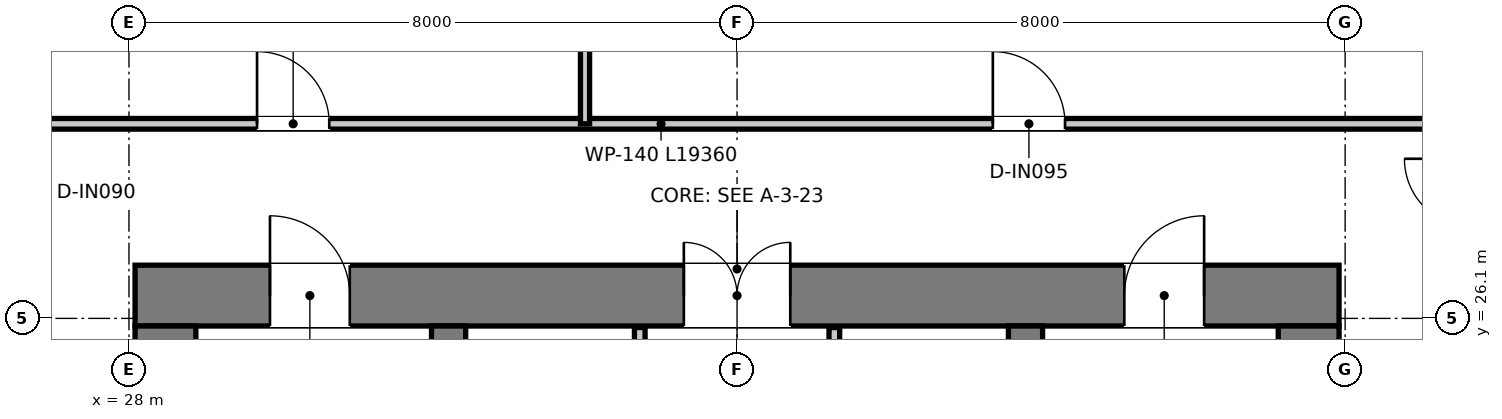
"""IFC4 building model, lengths in metres.
Left out: names, types, materials, properties, quantities, classifications, styles, units other than length and angle.
Written with IfcOpenShell. Run it as: python <this file> out.ifc"""

import sys

from ifc_helpers import new_model, si_unit, direction, frame, frame_2d, origin, place, context, subcontext, project, spatial, rectangle, extrude, element, fill, save


model = new_model("IFC4")
c1 = context("Model", 3, precision=1e-05, world=origin(), true_north=direction((0.0, 1.0)))
c2 = subcontext(c1, "Body", "Model", "MODEL_VIEW")
j1 = project(units=[si_unit("LENGTHUNIT", "METRE"), si_unit("PLANEANGLEUNIT", "RADIAN")], contexts=[c1])
p1 = place(None, origin())
s1 = spatial("IfcSite", under=j1, at=p1, CompositionType="ELEMENT")
p2 = place(p1, origin())
s2 = spatial("IfcBuilding", under=s1, at=p2, CompositionType="ELEMENT")
p3 = place(p2, frame((0.0, 0.0, 355.35)))
s3 = spatial("IfcBuildingStorey", under=s2, at=p3, CompositionType="ELEMENT", Elevation=355.35)
p4 = place(p3, frame((28.08, 26.4, 0.0), z_axis=(0.0, 0.0, 1.0), x_axis=(1.0, 0.0, 0.0)))
e1 = element("IfcWall", 1, at=p4, inside=s3, PredefinedType="SHEAR", context=c2, shape_type="SweptSolid", body=[
    extrude(rectangle(XDim=15.84, YDim=0.8, at=frame_2d((7.92, 0.0))), origin(), (0.0, 0.0, 1.0), 3.95),
])
p5 = place(p4, frame((7.22, 0.0, 0.0)))
e2 = element("IfcOpeningElement", 2, at=p5, cuts=e1, PredefinedType="OPENING", context=c2, shape_type="SweptSolid", body=[
    extrude(rectangle(XDim=1.4, YDim=2.2, at=frame_2d((0.7, 1.1))), frame((0.0, 0.41, 0.0), z_axis=(0.0, -1.0, 0.0), x_axis=(1.0, 0.0, 0.0)), (0.0, 0.0, 1.0), 0.82),
])
p6 = place(p4, frame((1.775, 0.0, 0.0)))
e3 = element("IfcOpeningElement", 3, at=p6, cuts=e1, PredefinedType="OPENING", context=c2, shape_type="SweptSolid", body=[
    extrude(rectangle(XDim=1.05, YDim=2.1, at=frame_2d((0.525, 1.05))), frame((0.0, 0.41, 0.0), z_axis=(0.0, -1.0, 0.0), x_axis=(1.0, 0.0, 0.0)), (0.0, 0.0, 1.0), 0.82),
])
p7 = place(p4, frame((13.015, 0.0, 0.0)))
e4 = element("IfcOpeningElement", 4, at=p7, cuts=e1, PredefinedType="OPENING", context=c2, shape_type="SweptSolid", body=[
    extrude(rectangle(XDim=1.05, YDim=2.1, at=frame_2d((0.525, 1.05))), frame((0.0, 0.41, 0.0), z_axis=(0.0, -1.0, 0.0), x_axis=(1.0, 0.0, 0.0)), (0.0, 0.0, 1.0), 0.82),
])
for number, where, z_axis, x_axis in (
    (5, (28.48, 11.3, 0.0), (0.0, 0.0, 1.0), (0.0, 1.0, 0.0)),
    (6, (43.52, 11.3, 0.0), (0.0, 0.0, 1.0), (0.0, 1.0, 0.0)),
):
    element("IfcWall", number, at=place(p3, frame(where, z_axis=z_axis, x_axis=x_axis)), inside=s3, PredefinedType="SHEAR", context=c2, shape_type="SweptSolid", body=[
        extrude(rectangle(XDim=14.7, YDim=0.8, at=frame_2d((7.35, 0.0))), origin(), (0.0, 0.0, 1.0), 3.95),
    ])
p8 = place(p3, frame((32.205, 13.22, 0.0), z_axis=(0.0, 0.0, 1.0), x_axis=(0.0, 1.0, 0.0)))
e7 = element("IfcWall", 7, at=p8, inside=s3, PredefinedType="SHEAR", context=c2, shape_type="SweptSolid", body=[
    extrude(rectangle(XDim=12.78, YDim=0.45, at=frame_2d((6.39, 0.0))), origin(), (0.0, 0.0, 1.0), 3.95),
])
p9 = place(p8, frame((10.58, 0.0, 0.0)))
e8 = element("IfcOpeningElement", 8, at=p9, cuts=e7, PredefinedType="OPENING", context=c2, shape_type="SweptSolid", body=[
    extrude(rectangle(XDim=1.1, YDim=2.15, at=frame_2d((0.55, 1.075))), frame((0.0, 0.235, 0.0), z_axis=(0.0, -1.0, 0.0), x_axis=(1.0, 0.0, 0.0)), (0.0, 0.0, 1.0), 0.47),
])
p10 = place(p3, frame((39.795, 13.22, 0.0), z_axis=(0.0, 0.0, 1.0), x_axis=(0.0, 1.0, 0.0)))
e9 = element("IfcWall", 9, at=p10, inside=s3, PredefinedType="SHEAR", context=c2, shape_type="SweptSolid", body=[
    extrude(rectangle(XDim=12.78, YDim=0.45, at=frame_2d((6.39, 0.0))), origin(), (0.0, 0.0, 1.0), 3.95),
])
p11 = place(p10, frame((10.58, 0.0, 0.0)))
e10 = element("IfcOpeningElement", 10, at=p11, cuts=e9, PredefinedType="OPENING", context=c2, shape_type="SweptSolid", body=[
    extrude(rectangle(XDim=1.1, YDim=2.15, at=frame_2d((0.55, 1.075))), frame((0.0, 0.235, 0.0), z_axis=(0.0, -1.0, 0.0), x_axis=(1.0, 0.0, 0.0)), (0.0, 0.0, 1.0), 0.47),
])
p12 = place(p3, frame((34.72, 20.2, 0.0), z_axis=(0.0, 0.0, 1.0), x_axis=(0.0, 1.0, 0.0)))
e11 = element("IfcWall", 11, at=p12, inside=s3, PredefinedType="PARTITIONING", context=c2, shape_type="SweptSolid", body=[
    extrude(rectangle(XDim=5.78, YDim=0.14, at=frame_2d((2.89, 0.0))), origin(), (0.0, 0.0, 1.0), 2.82),
])
p13 = place(p12, frame((1.05, 0.0, 0.0)))
e12 = element("IfcOpeningElement", 12, at=p13, cuts=e11, PredefinedType="OPENING", context=c2, shape_type="SweptSolid", body=[
    extrude(rectangle(XDim=0.9, YDim=2.1, at=frame_2d((0.45, 1.05))), frame((0.0, 0.08, 0.0), z_axis=(0.0, -1.0, 0.0), x_axis=(1.0, 0.0, 0.0)), (0.0, 0.0, 1.0), 0.16),
])
p14 = place(p3, frame((37.28, 20.2, 0.0), z_axis=(0.0, 0.0, 1.0), x_axis=(0.0, 1.0, 0.0)))
e13 = element("IfcWall", 13, at=p14, inside=s3, PredefinedType="PARTITIONING", context=c2, shape_type="SweptSolid", body=[
    extrude(rectangle(XDim=5.78, YDim=0.14, at=frame_2d((2.89, 0.0))), origin(), (0.0, 0.0, 1.0), 2.82),
])
p15 = place(p14, frame((0.95, 0.0, 0.0)))
e14 = element("IfcOpeningElement", 14, at=p15, cuts=e13, PredefinedType="OPENING", context=c2, shape_type="SweptSolid", body=[
    extrude(rectangle(XDim=1.1, YDim=2.15, at=frame_2d((0.55, 1.075))), frame((0.0, 0.08, 0.0), z_axis=(0.0, -1.0, 0.0), x_axis=(1.0, 0.0, 0.0)), (0.0, 0.0, 1.0), 0.16),
])
p16 = place(p3, frame((26.32, 28.66, 0.0), z_axis=(0.0, 0.0, 1.0), x_axis=(1.0, 0.0, 0.0)))
e15 = element("IfcWall", 15, at=p16, inside=s3, PredefinedType="PARTITIONING", context=c2, shape_type="SweptSolid", body=[
    extrude(rectangle(XDim=19.36, YDim=0.14, at=frame_2d((9.68, 0.0))), origin(), (0.0, 0.0, 1.0), 3.18),
])
p17 = place(p16, frame((3.365, 0.0, 0.0)))
e16 = element("IfcOpeningElement", 16, at=p17, cuts=e15, PredefinedType="OPENING", context=c2, shape_type="SweptSolid", body=[
    extrude(rectangle(XDim=0.95, YDim=2.1, at=frame_2d((0.475, 1.05))), frame((0.0, 0.08, 0.0), z_axis=(0.0, -1.0, 0.0), x_axis=(1.0, 0.0, 0.0)), (0.0, 0.0, 1.0), 0.16),
])
p18 = place(p16, frame((13.045, 0.0, 0.0)))
e17 = element("IfcOpeningElement", 17, at=p18, cuts=e15, PredefinedType="OPENING", context=c2, shape_type="SweptSolid", body=[
    extrude(rectangle(XDim=0.95, YDim=2.1, at=frame_2d((0.475, 1.05))), frame((0.0, 0.08, 0.0), z_axis=(0.0, -1.0, 0.0), x_axis=(1.0, 0.0, 0.0)), (0.0, 0.0, 1.0), 0.16),
])
p19 = place(p3, frame((34.0, 28.66, 0.0), z_axis=(0.0, 0.0, 1.0), x_axis=(0.0, 1.0, 0.0)))
e18 = element("IfcWall", 18, at=p19, inside=s3, PredefinedType="PARTITIONING", context=c2, shape_type="SweptSolid", body=[
    extrude(rectangle(XDim=17.007, YDim=0.12, at=frame_2d((8.504, 0.0))), origin(), (0.0, 0.0, 1.0), 3.13),
])
p20 = place(p5, origin())
e19 = element("IfcDoor", 19, at=p20, inside=s3, OperationType="DOUBLE_DOOR_SINGLE_SWING", PredefinedType="DOOR", context=c2, shape_type="SweptSolid", body=[
    extrude(rectangle(XDim=1.4, YDim=2.2, at=frame_2d((0.7, 1.1))), frame((0.0, 0.025, 0.0), z_axis=(0.0, -1.0, 0.0), x_axis=(1.0, 0.0, 0.0)), (0.0, 0.0, 1.0), 0.05),
])
fill(e2, e19)
p21 = place(p6, origin())
e20 = element("IfcDoor", 20, at=p21, inside=s3, OperationType="SINGLE_SWING_LEFT", PredefinedType="DOOR", context=c2, shape_type="SweptSolid", body=[
    extrude(rectangle(XDim=1.05, YDim=2.1, at=frame_2d((0.525, 1.05))), frame((0.0, 0.025, 0.0), z_axis=(0.0, -1.0, 0.0), x_axis=(1.0, 0.0, 0.0)), (0.0, 0.0, 1.0), 0.05),
])
fill(e3, e20)
p22 = place(p7, origin())
e21 = element("IfcDoor", 21, at=p22, inside=s3, OperationType="SINGLE_SWING_RIGHT", PredefinedType="DOOR", context=c2, shape_type="SweptSolid", body=[
    extrude(rectangle(XDim=1.05, YDim=2.1, at=frame_2d((0.525, 1.05))), frame((0.0, 0.025, 0.0), z_axis=(0.0, -1.0, 0.0), x_axis=(1.0, 0.0, 0.0)), (0.0, 0.0, 1.0), 0.05),
])
fill(e4, e21)
p23 = place(p17, origin())
e22 = element("IfcDoor", 22, at=p23, inside=s3, OperationType="SINGLE_SWING_LEFT", PredefinedType="DOOR", context=c2, shape_type="SweptSolid", body=[
    extrude(rectangle(XDim=0.95, YDim=2.1, at=frame_2d((0.475, 1.05))), frame((0.0, 0.025, 0.0), z_axis=(0.0, -1.0, 0.0), x_axis=(1.0, 0.0, 0.0)), (0.0, 0.0, 1.0), 0.05),
])
fill(e16, e22)
p24 = place(p18, origin())
e23 = element("IfcDoor", 23, at=p24, inside=s3, OperationType="SINGLE_SWING_LEFT", PredefinedType="DOOR", context=c2, shape_type="SweptSolid", body=[
    extrude(rectangle(XDim=0.95, YDim=2.1, at=frame_2d((0.475, 1.05))), frame((0.0, 0.025, 0.0), z_axis=(0.0, -1.0, 0.0), x_axis=(1.0, 0.0, 0.0)), (0.0, 0.0, 1.0), 0.05),
])
fill(e17, e23)
save(model, sys.argv[1])
